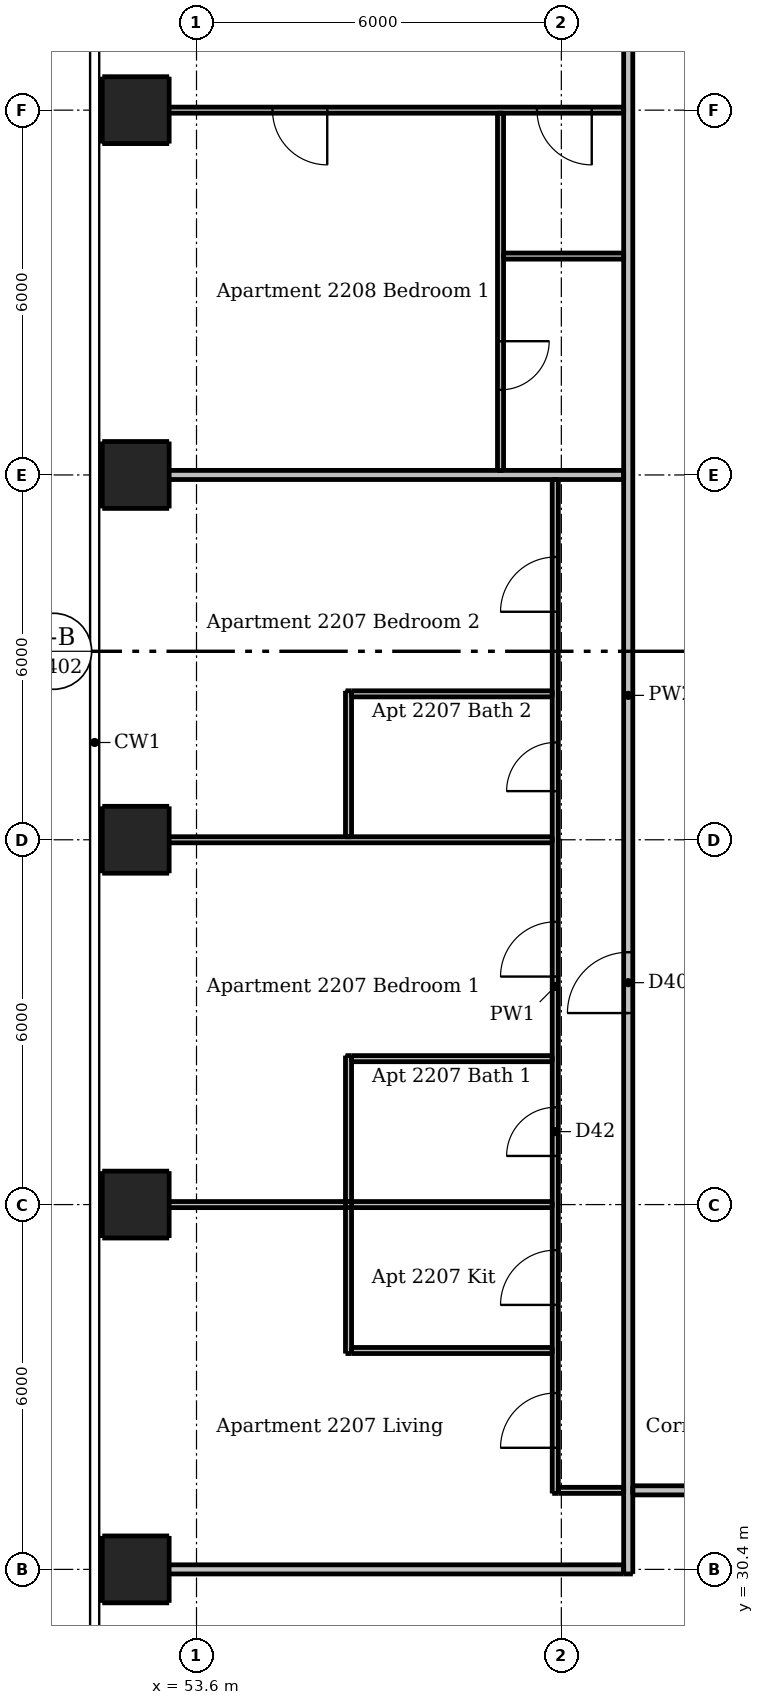
"""IFC4 building model, lengths in metres.
Left out: names, types, materials, properties, quantities, classifications, styles, units other than length and angle.
Written with IfcOpenShell. Run it as: python <this file> out.ifc"""

import sys

from ifc_helpers import new_model, si_unit, direction, frame, frame_2d, origin, origin_2d, place, context, subcontext, project, spatial, rectangle, extrude, element, fill, save


model = new_model("IFC4")
c1 = context("Model", 3, precision=1e-05, world=origin(), true_north=direction((0.0, 1.0)))
c2 = subcontext(c1, "Body", "Model", "MODEL_VIEW")
j1 = project(units=[si_unit("LENGTHUNIT", "METRE"), si_unit("PLANEANGLEUNIT", "RADIAN")], contexts=[c1])
p1 = place(None, origin())
s1 = spatial("IfcSite", under=j1, at=p1, CompositionType="ELEMENT")
p2 = place(p1, origin())
s2 = spatial("IfcBuilding", under=s1, at=p2, CompositionType="ELEMENT")
p3 = place(p2, frame((0.0, 0.0, 85.3)))
s3 = spatial("IfcBuildingStorey", under=s2, at=p3, CompositionType="ELEMENT", Elevation=85.3)
for number, where, z_axis, x_axis in (
    (1, (52.6, 30.4, 0.0), (0.0, 0.0, 1.0), (1.0, 0.0, 0.0)),
    (2, (52.6, 36.4, 0.0), (0.0, 0.0, 1.0), (1.0, 0.0, 0.0)),
    (3, (52.6, 42.4, 0.0), (0.0, 0.0, 1.0), (1.0, 0.0, 0.0)),
    (4, (52.6, 48.4, 0.0), (0.0, 0.0, 1.0), (1.0, 0.0, 0.0)),
    (5, (52.6, 54.4, 0.0), (0.0, 0.0, 1.0), (1.0, 0.0, 0.0)),
):
    element("IfcColumn", number, at=place(p3, frame(where, z_axis=z_axis, x_axis=x_axis)), inside=s3, PredefinedType="COLUMN", context=c2, shape_type="SweptSolid", body=[
        extrude(rectangle(XDim=1.1, YDim=1.1, at=origin_2d()), origin(), (0.0, 0.0, 1.0), 3.05),
    ])
p4 = place(p3, frame((56.1, 33.95, 0.0), z_axis=(0.0, 0.0, 1.0), x_axis=(0.0, 1.0, 0.0)))
e6 = element("IfcWall", 6, at=p4, inside=s3, PredefinedType="PARTITIONING", context=c2, shape_type="SweptSolid", body=[
    extrude(rectangle(XDim=4.9, YDim=0.1, at=frame_2d((2.45, 0.0))), origin(), (0.0, 0.0, 1.0), 3.05),
])
p5 = place(p3, frame((56.1, 42.45, 0.0), z_axis=(0.0, 0.0, 1.0), x_axis=(0.0, 1.0, 0.0)))
e7 = element("IfcWall", 7, at=p5, inside=s3, PredefinedType="PARTITIONING", context=c2, shape_type="SweptSolid", body=[
    extrude(rectangle(XDim=2.4, YDim=0.1, at=frame_2d((1.2, 0.0))), origin(), (0.0, 0.0, 1.0), 3.05),
])
p6 = place(p3, frame((58.6, 54.35, 0.0), z_axis=(0.0, 0.0, 1.0), x_axis=(0.0, -1.0, 0.0)))
e8 = element("IfcWall", 8, at=p6, inside=s3, PredefinedType="PARTITIONING", context=c2, shape_type="SweptSolid", body=[
    extrude(rectangle(XDim=5.875, YDim=0.1, at=frame_2d((2.938, 0.0))), origin(), (0.0, 0.0, 1.0), 3.05),
])
p7 = place(p6, frame((3.75, 0.0, 0.0)))
e9 = element("IfcOpeningElement", 9, at=p7, cuts=e8, PredefinedType="OPENING", context=c2, shape_type="SweptSolid", body=[
    extrude(rectangle(XDim=0.8, YDim=2.1, at=frame_2d((0.4, 1.05))), frame((0.0, 0.06, 0.0), z_axis=(0.0, -1.0, 0.0), x_axis=(1.0, 0.0, 0.0)), (0.0, 0.0, 1.0), 0.12),
])
p8 = place(p3, frame((59.5, 31.65, 0.0), z_axis=(0.0, 0.0, 1.0), x_axis=(0.0, 1.0, 0.0)))
e10 = element("IfcWall", 10, at=p8, inside=s3, PredefinedType="PARTITIONING", context=c2, shape_type="SweptSolid", body=[
    extrude(rectangle(XDim=16.675, YDim=0.1, at=frame_2d((8.337, 0.0))), origin(), (0.0, 0.0, 1.0), 2.51),
])
p9 = place(p8, frame((0.75, 0.0, 0.0)))
e11 = element("IfcOpeningElement", 11, at=p9, cuts=e10, PredefinedType="OPENING", context=c2, shape_type="SweptSolid", body=[
    extrude(rectangle(XDim=0.9, YDim=2.1, at=frame_2d((0.45, 1.05))), frame((0.0, 0.06, 0.0), z_axis=(0.0, -1.0, 0.0), x_axis=(1.0, 0.0, 0.0)), (0.0, 0.0, 1.0), 0.12),
])
p10 = place(p8, frame((3.1, 0.0, 0.0)))
e12 = element("IfcOpeningElement", 12, at=p10, cuts=e10, PredefinedType="OPENING", context=c2, shape_type="SweptSolid", body=[
    extrude(rectangle(XDim=0.9, YDim=2.1, at=frame_2d((0.45, 1.05))), frame((0.0, 0.06, 0.0), z_axis=(0.0, -1.0, 0.0), x_axis=(1.0, 0.0, 0.0)), (0.0, 0.0, 1.0), 0.12),
])
p11 = place(p8, frame((8.5, 0.0, 0.0)))
e13 = element("IfcOpeningElement", 13, at=p11, cuts=e10, PredefinedType="OPENING", context=c2, shape_type="SweptSolid", body=[
    extrude(rectangle(XDim=0.9, YDim=2.1, at=frame_2d((0.45, 1.05))), frame((0.0, 0.06, 0.0), z_axis=(0.0, -1.0, 0.0), x_axis=(1.0, 0.0, 0.0)), (0.0, 0.0, 1.0), 0.12),
])
p12 = place(p8, frame((14.5, 0.0, 0.0)))
e14 = element("IfcOpeningElement", 14, at=p12, cuts=e10, PredefinedType="OPENING", context=c2, shape_type="SweptSolid", body=[
    extrude(rectangle(XDim=0.9, YDim=2.1, at=frame_2d((0.45, 1.05))), frame((0.0, 0.06, 0.0), z_axis=(0.0, -1.0, 0.0), x_axis=(1.0, 0.0, 0.0)), (0.0, 0.0, 1.0), 0.12),
])
p13 = place(p8, frame((5.55, 0.0, 0.0)))
e15 = element("IfcOpeningElement", 15, at=p13, cuts=e10, PredefinedType="OPENING", context=c2, shape_type="SweptSolid", body=[
    extrude(rectangle(XDim=0.8, YDim=2.1, at=frame_2d((0.4, 1.05))), frame((0.0, 0.06, 0.0), z_axis=(0.0, -1.0, 0.0), x_axis=(1.0, 0.0, 0.0)), (0.0, 0.0, 1.0), 0.12),
])
p14 = place(p8, frame((11.55, 0.0, 0.0)))
e16 = element("IfcOpeningElement", 16, at=p14, cuts=e10, PredefinedType="OPENING", context=c2, shape_type="SweptSolid", body=[
    extrude(rectangle(XDim=0.8, YDim=2.1, at=frame_2d((0.4, 1.05))), frame((0.0, 0.06, 0.0), z_axis=(0.0, -1.0, 0.0), x_axis=(1.0, 0.0, 0.0)), (0.0, 0.0, 1.0), 0.12),
])
p15 = place(p3, frame((60.625, 54.4, 0.0), z_axis=(0.0, 0.0, 1.0), x_axis=(-1.0, 0.0, 0.0)))
e17 = element("IfcWall", 17, at=p15, inside=s3, PredefinedType="PARTITIONING", context=c2, shape_type="SweptSolid", body=[
    extrude(rectangle(XDim=8.625, YDim=0.1, at=frame_2d((4.312, 0.0))), origin(), (0.0, 0.0, 1.0), 2.516),
])
p16 = place(p15, frame((0.525, 0.0, 0.0)))
e18 = element("IfcOpeningElement", 18, at=p16, cuts=e17, PredefinedType="OPENING", context=c2, shape_type="SweptSolid", body=[
    extrude(rectangle(XDim=0.9, YDim=2.1, at=frame_2d((0.45, 1.05))), frame((0.0, 0.06, 0.0), z_axis=(0.0, -1.0, 0.0), x_axis=(1.0, 0.0, 0.0)), (0.0, 0.0, 1.0), 0.12),
])
p17 = place(p15, frame((4.875, 0.0, 0.0)))
e19 = element("IfcOpeningElement", 19, at=p17, cuts=e17, PredefinedType="OPENING", context=c2, shape_type="SweptSolid", body=[
    extrude(rectangle(XDim=0.9, YDim=2.1, at=frame_2d((0.45, 1.05))), frame((0.0, 0.06, 0.0), z_axis=(0.0, -1.0, 0.0), x_axis=(1.0, 0.0, 0.0)), (0.0, 0.0, 1.0), 0.12),
])
p18 = place(p3, frame((58.65, 52.0, 0.0), z_axis=(0.0, 0.0, 1.0), x_axis=(1.0, 0.0, 0.0)))
e20 = element("IfcWall", 20, at=p18, inside=s3, PredefinedType="PARTITIONING", context=c2, shape_type="SweptSolid", body=[
    extrude(rectangle(XDim=1.975, YDim=0.1, at=frame_2d((0.988, 0.0))), origin(), (0.0, 0.0, 1.0), 3.05),
])
p19 = place(p3, frame((56.15, 44.8, 0.0), z_axis=(0.0, 0.0, 1.0), x_axis=(1.0, 0.0, 0.0)))
e21 = element("IfcWall", 21, at=p19, inside=s3, PredefinedType="PARTITIONING", context=c2, shape_type="SweptSolid", body=[
    extrude(rectangle(XDim=3.3, YDim=0.1, at=frame_2d((1.65, 0.0))), origin(), (0.0, 0.0, 1.0), 3.05),
])
p20 = place(p3, frame((52.0, 42.4, 0.0), z_axis=(0.0, 0.0, 1.0), x_axis=(1.0, 0.0, 0.0)))
e22 = element("IfcWall", 22, at=p20, inside=s3, PredefinedType="PARTITIONING", context=c2, shape_type="SweptSolid", body=[
    extrude(rectangle(XDim=7.45, YDim=0.1, at=frame_2d((3.725, 0.0))), origin(), (0.0, 0.0, 1.0), 2.516),
])
p21 = place(p3, frame((56.15, 38.8, 0.0), z_axis=(0.0, 0.0, 1.0), x_axis=(1.0, 0.0, 0.0)))
e23 = element("IfcWall", 23, at=p21, inside=s3, PredefinedType="PARTITIONING", context=c2, shape_type="SweptSolid", body=[
    extrude(rectangle(XDim=3.3, YDim=0.1, at=frame_2d((1.65, 0.0))), origin(), (0.0, 0.0, 1.0), 3.05),
])
p22 = place(p3, frame((52.0, 36.4, 0.0), z_axis=(0.0, 0.0, 1.0), x_axis=(1.0, 0.0, 0.0)))
e24 = element("IfcWall", 24, at=p22, inside=s3, PredefinedType="PARTITIONING", context=c2, shape_type="SweptSolid", body=[
    extrude(rectangle(XDim=7.45, YDim=0.1, at=frame_2d((3.725, 0.0))), origin(), (0.0, 0.0, 1.0), 2.516),
])
p23 = place(p3, frame((56.15, 34.0, 0.0), z_axis=(0.0, 0.0, 1.0), x_axis=(1.0, 0.0, 0.0)))
e25 = element("IfcWall", 25, at=p23, inside=s3, PredefinedType="PARTITIONING", context=c2, shape_type="SweptSolid", body=[
    extrude(rectangle(XDim=3.3, YDim=0.1, at=frame_2d((1.65, 0.0))), origin(), (0.0, 0.0, 1.0), 3.05),
])
p24 = place(p3, frame((59.55, 31.7, 0.0), z_axis=(0.0, 0.0, 1.0), x_axis=(1.0, 0.0, 0.0)))
e26 = element("IfcWall", 26, at=p24, inside=s3, PredefinedType="PARTITIONING", context=c2, shape_type="SweptSolid", body=[
    extrude(rectangle(XDim=1.075, YDim=0.1, at=frame_2d((0.538, 0.0))), origin(), (0.0, 0.0, 1.0), 3.05),
])
p25 = place(p3, frame((60.7, 30.325, 0.0), z_axis=(0.0, 0.0, 1.0), x_axis=(0.0, 1.0, 0.0)))
e27 = element("IfcWall", 27, at=p25, inside=s3, PredefinedType="PARTITIONING", context=c2, shape_type="SweptSolid", body=[
    extrude(rectangle(XDim=28.9, YDim=0.15, at=frame_2d((14.45, 0.0))), origin(), (0.0, 0.0, 1.0), 3.05),
])
p26 = place(p25, frame((9.225, 0.0, 0.0)))
e28 = element("IfcOpeningElement", 28, at=p26, cuts=e27, PredefinedType="OPENING", context=c2, shape_type="SweptSolid", body=[
    extrude(rectangle(XDim=1.0, YDim=2.1, at=frame_2d((0.5, 1.05))), frame((0.0, 0.085, 0.0), z_axis=(0.0, -1.0, 0.0), x_axis=(1.0, 0.0, 0.0)), (0.0, 0.0, 1.0), 0.17),
])
p27 = place(p25, frame((26.025, 0.0, 0.0)))
e29 = element("IfcOpeningElement", 29, at=p27, cuts=e27, PredefinedType="OPENING", context=c2, shape_type="SweptSolid", body=[
    extrude(rectangle(XDim=1.0, YDim=2.1, at=frame_2d((0.5, 1.05))), frame((0.0, 0.085, 0.0), z_axis=(0.0, -1.0, 0.0), x_axis=(1.0, 0.0, 0.0)), (0.0, 0.0, 1.0), 0.17),
])
p28 = place(p3, frame((52.0, 48.4, 0.0), z_axis=(0.0, 0.0, 1.0), x_axis=(1.0, 0.0, 0.0)))
e30 = element("IfcWall", 30, at=p28, inside=s3, PredefinedType="PARTITIONING", context=c2, shape_type="SweptSolid", body=[
    extrude(rectangle(XDim=8.625, YDim=0.15, at=frame_2d((4.312, 0.0))), origin(), (0.0, 0.0, 1.0), 2.516),
])
p29 = place(p3, frame((89.525, 31.7, 0.0), z_axis=(0.0, 0.0, 1.0), x_axis=(-1.0, 0.0, 0.0)))
e31 = element("IfcWall", 31, at=p29, inside=s3, PredefinedType="PARTITIONING", context=c2, shape_type="SweptSolid", body=[
    extrude(rectangle(XDim=28.75, YDim=0.15, at=frame_2d((14.375, 0.0))), origin(), (0.0, 0.0, 1.0), 3.05),
])
p30 = place(p29, frame((24.625, 0.0, 0.0)))
e32 = element("IfcOpeningElement", 32, at=p30, cuts=e31, PredefinedType="OPENING", context=c2, shape_type="SweptSolid", body=[
    extrude(rectangle(XDim=1.0, YDim=2.1, at=frame_2d((0.5, 1.05))), frame((0.0, 0.085, 0.0), z_axis=(0.0, -1.0, 0.0), x_axis=(1.0, 0.0, 0.0)), (0.0, 0.0, 1.0), 0.17),
])
p31 = place(p29, frame((7.525, 0.0, 0.0)))
e33 = element("IfcOpeningElement", 33, at=p31, cuts=e31, PredefinedType="OPENING", context=c2, shape_type="SweptSolid", body=[
    extrude(rectangle(XDim=1.0, YDim=2.1, at=frame_2d((0.5, 1.05))), frame((0.0, 0.085, 0.0), z_axis=(0.0, -1.0, 0.0), x_axis=(1.0, 0.0, 0.0)), (0.0, 0.0, 1.0), 0.17),
])
p32 = place(p3, frame((52.0, 30.4, 0.0), z_axis=(0.0, 0.0, 1.0), x_axis=(1.0, 0.0, 0.0)))
e34 = element("IfcWall", 34, at=p32, inside=s3, PredefinedType="PARTITIONING", context=c2, shape_type="SweptSolid", body=[
    extrude(rectangle(XDim=8.625, YDim=0.15, at=frame_2d((4.312, 0.0))), origin(), (0.0, 0.0, 1.0), 2.647),
])
p33 = place(p26, origin())
e35 = element("IfcDoor", 35, at=p33, inside=s3, OperationType="SINGLE_SWING_LEFT", PredefinedType="DOOR", context=c2, shape_type="SweptSolid", body=[
    extrude(rectangle(XDim=1.0, YDim=2.1, at=frame_2d((0.5, 1.05))), frame((0.0, 0.025, 0.0), z_axis=(0.0, -1.0, 0.0), x_axis=(1.0, 0.0, 0.0)), (0.0, 0.0, 1.0), 0.05),
])
fill(e28, e35)
p34 = place(p9, origin())
e36 = element("IfcDoor", 36, at=p34, inside=s3, OperationType="SINGLE_SWING_LEFT", PredefinedType="DOOR", context=c2, shape_type="SweptSolid", body=[
    extrude(rectangle(XDim=0.9, YDim=2.1, at=frame_2d((0.45, 1.05))), frame((0.0, 0.025, 0.0), z_axis=(0.0, -1.0, 0.0), x_axis=(1.0, 0.0, 0.0)), (0.0, 0.0, 1.0), 0.05),
])
fill(e11, e36)
p35 = place(p10, origin())
e37 = element("IfcDoor", 37, at=p35, inside=s3, OperationType="SINGLE_SWING_LEFT", PredefinedType="DOOR", context=c2, shape_type="SweptSolid", body=[
    extrude(rectangle(XDim=0.9, YDim=2.1, at=frame_2d((0.45, 1.05))), frame((0.0, 0.025, 0.0), z_axis=(0.0, -1.0, 0.0), x_axis=(1.0, 0.0, 0.0)), (0.0, 0.0, 1.0), 0.05),
])
fill(e12, e37)
p36 = place(p11, origin())
e38 = element("IfcDoor", 38, at=p36, inside=s3, OperationType="SINGLE_SWING_LEFT", PredefinedType="DOOR", context=c2, shape_type="SweptSolid", body=[
    extrude(rectangle(XDim=0.9, YDim=2.1, at=frame_2d((0.45, 1.05))), frame((0.0, 0.025, 0.0), z_axis=(0.0, -1.0, 0.0), x_axis=(1.0, 0.0, 0.0)), (0.0, 0.0, 1.0), 0.05),
])
fill(e13, e38)
p37 = place(p12, origin())
e39 = element("IfcDoor", 39, at=p37, inside=s3, OperationType="SINGLE_SWING_LEFT", PredefinedType="DOOR", context=c2, shape_type="SweptSolid", body=[
    extrude(rectangle(XDim=0.9, YDim=2.1, at=frame_2d((0.45, 1.05))), frame((0.0, 0.025, 0.0), z_axis=(0.0, -1.0, 0.0), x_axis=(1.0, 0.0, 0.0)), (0.0, 0.0, 1.0), 0.05),
])
fill(e14, e39)
p38 = place(p13, origin())
e40 = element("IfcDoor", 40, at=p38, inside=s3, OperationType="SINGLE_SWING_LEFT", PredefinedType="DOOR", context=c2, shape_type="SweptSolid", body=[
    extrude(rectangle(XDim=0.8, YDim=2.1, at=frame_2d((0.4, 1.05))), frame((0.0, 0.025, 0.0), z_axis=(0.0, -1.0, 0.0), x_axis=(1.0, 0.0, 0.0)), (0.0, 0.0, 1.0), 0.05),
])
fill(e15, e40)
p39 = place(p14, origin())
e41 = element("IfcDoor", 41, at=p39, inside=s3, OperationType="SINGLE_SWING_LEFT", PredefinedType="DOOR", context=c2, shape_type="SweptSolid", body=[
    extrude(rectangle(XDim=0.8, YDim=2.1, at=frame_2d((0.4, 1.05))), frame((0.0, 0.025, 0.0), z_axis=(0.0, -1.0, 0.0), x_axis=(1.0, 0.0, 0.0)), (0.0, 0.0, 1.0), 0.05),
])
fill(e16, e41)
p40 = place(p16, origin())
e42 = element("IfcDoor", 42, at=p40, inside=s3, OperationType="SINGLE_SWING_LEFT", PredefinedType="DOOR", context=c2, shape_type="SweptSolid", body=[
    extrude(rectangle(XDim=0.9, YDim=2.1, at=frame_2d((0.45, 1.05))), frame((0.0, 0.025, 0.0), z_axis=(0.0, -1.0, 0.0), x_axis=(1.0, 0.0, 0.0)), (0.0, 0.0, 1.0), 0.05),
])
fill(e18, e42)
p41 = place(p17, origin())
e43 = element("IfcDoor", 43, at=p41, inside=s3, OperationType="SINGLE_SWING_LEFT", PredefinedType="DOOR", context=c2, shape_type="SweptSolid", body=[
    extrude(rectangle(XDim=0.9, YDim=2.1, at=frame_2d((0.45, 1.05))), frame((0.0, 0.025, 0.0), z_axis=(0.0, -1.0, 0.0), x_axis=(1.0, 0.0, 0.0)), (0.0, 0.0, 1.0), 0.05),
])
fill(e19, e43)
p42 = place(p7, origin())
e44 = element("IfcDoor", 44, at=p42, inside=s3, OperationType="SINGLE_SWING_LEFT", PredefinedType="DOOR", context=c2, shape_type="SweptSolid", body=[
    extrude(rectangle(XDim=0.8, YDim=2.1, at=frame_2d((0.4, 1.05))), frame((0.0, 0.025, 0.0), z_axis=(0.0, -1.0, 0.0), x_axis=(1.0, 0.0, 0.0)), (0.0, 0.0, 1.0), 0.05),
])
fill(e9, e44)
save(model, sys.argv[1])
